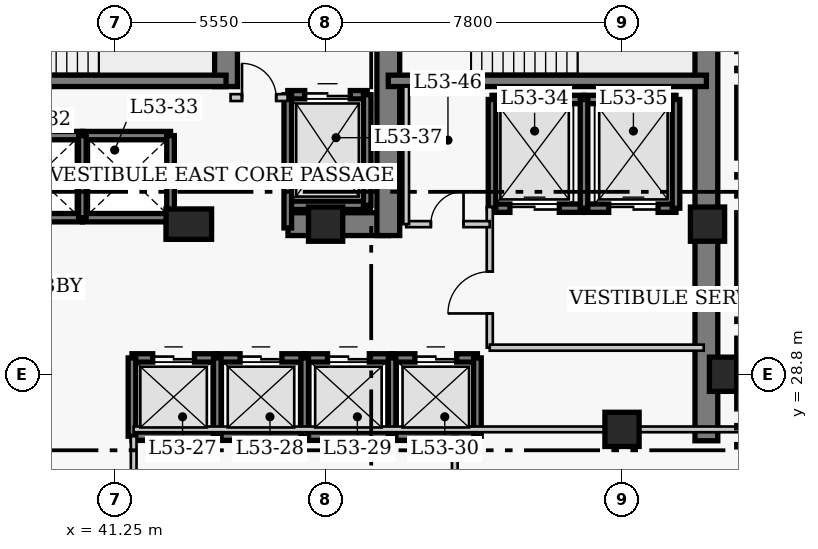
"""IFC4 building model, lengths in metres.
Left out: names, types, materials, properties, quantities, classifications, styles, units other than length and angle.
Written with IfcOpenShell. Run it as: python <this file> out.ifc"""

import sys

from ifc_helpers import new_model, si_unit, direction, frame, frame_2d, origin, origin_2d, place, context, subcontext, project, spatial, rectangle, extrude, element, fill, save


model = new_model("IFC4")
c1 = context("Model", 3, precision=1e-05, world=origin(), true_north=direction((0.0, 1.0)))
c2 = subcontext(c1, "Body", "Model", "MODEL_VIEW")
j1 = project(units=[si_unit("LENGTHUNIT", "METRE"), si_unit("PLANEANGLEUNIT", "RADIAN")], contexts=[c1])
p1 = place(None, origin())
s1 = spatial("IfcSite", under=j1, at=p1, CompositionType="ELEMENT")
p2 = place(p1, origin())
s2 = spatial("IfcBuilding", under=s1, at=p2, CompositionType="ELEMENT")
p3 = place(p2, frame((0.0, 0.0, 212.4)))
s3 = spatial("IfcBuildingStorey", under=s2, at=p3, CompositionType="ELEMENT", Elevation=212.4)
p4 = place(p3, frame((56.82, 27.05, 0.0), z_axis=(0.0, 0.0, 1.0), x_axis=(0.0, 1.0, 0.0)))
e1 = element("IfcWall", 1, at=p4, inside=s3, PredefinedType="SHEAR", context=c2, shape_type="SweptSolid", body=[
    extrude(rectangle(XDim=13.57, YDim=0.6, at=frame_2d((6.785, 0.0))), origin(), (0.0, 0.0, 1.0), 3.9),
])
p5 = place(p3, frame((45.81, 32.75, 0.0), z_axis=(0.0, 0.0, 1.0), x_axis=(1.0, 0.0, 0.0)))
e2 = element("IfcWall", 2, at=p5, inside=s3, PredefinedType="SHEAR", context=c2, shape_type="SweptSolid", body=[
    extrude(rectangle(XDim=2.64, YDim=0.6, at=frame_2d((1.32, 0.0))), origin(), (0.0, 0.0, 1.0), 3.9),
])
p6 = place(p3, frame((44.18, 36.37, 0.0), z_axis=(0.0, 0.0, 1.0), x_axis=(0.0, 1.0, 0.0)))
e3 = element("IfcWall", 3, at=p6, inside=s3, PredefinedType="SHEAR", context=c2, shape_type="SweptSolid", body=[
    extrude(rectangle(XDim=3.95, YDim=0.6, at=frame_2d((1.975, 0.0))), origin(), (0.0, 0.0, 1.0), 3.9),
])
p7 = place(p3, frame((48.45, 32.45, 0.0), z_axis=(0.0, 0.0, 1.0), x_axis=(0.0, 1.0, 0.0)))
e4 = element("IfcWall", 4, at=p7, inside=s3, PredefinedType="SHEAR", context=c2, shape_type="SweptSolid", body=[
    extrude(rectangle(XDim=7.87, YDim=0.6, at=frame_2d((3.935, 0.0))), origin(), (0.0, 0.0, 1.0), 3.9),
])
p8 = place(p7, frame((5.75, 0.0, 0.0)))
e5 = element("IfcOpeningElement", 5, at=p8, cuts=e4, PredefinedType="OPENING", context=c2, shape_type="SweptSolid", body=[
    extrude(rectangle(XDim=1.1, YDim=2.15, at=frame_2d((0.55, 1.075))), frame((0.0, 0.31, 0.0), z_axis=(0.0, -1.0, 0.0), x_axis=(1.0, 0.0, 0.0)), (0.0, 0.0, 1.0), 0.62),
])
p9 = place(p3, frame((35.85, 36.52, 0.0), z_axis=(0.0, 0.0, 1.0), x_axis=(1.0, 0.0, 0.0)))
e6 = element("IfcWall", 6, at=p9, inside=s3, PredefinedType="SHEAR", context=c2, shape_type="SweptSolid", body=[
    extrude(rectangle(XDim=8.33, YDim=0.3, at=frame_2d((4.165, 0.0))), origin(), (0.0, 0.0, 1.0), 3.9),
])
p10 = place(p3, frame((48.45, 36.52, 0.0), z_axis=(0.0, 0.0, 1.0), x_axis=(1.0, 0.0, 0.0)))
e7 = element("IfcWall", 7, at=p10, inside=s3, PredefinedType="SHEAR", context=c2, shape_type="SweptSolid", body=[
    extrude(rectangle(XDim=8.37, YDim=0.3, at=frame_2d((4.185, 0.0))), origin(), (0.0, 0.0, 1.0), 3.9),
])
p11 = place(p3, frame((57.35, 28.8, 0.0), z_axis=(0.0, 0.0, 1.0), x_axis=(1.0, 0.0, 0.0)))
e8 = element("IfcColumn", 8, at=p11, inside=s3, PredefinedType="COLUMN", context=c2, shape_type="SweptSolid", body=[
    extrude(rectangle(XDim=0.9, YDim=0.9, at=origin_2d()), origin(), (0.0, 0.0, 1.0), 3.9),
])
p12 = place(p3, frame((43.2, 32.75, 0.0), z_axis=(0.0, 0.0, 1.0), x_axis=(1.0, 0.0, 0.0)))
e9 = element("IfcColumn", 9, at=p12, inside=s3, PredefinedType="COLUMN", context=c2, shape_type="SweptSolid", body=[
    extrude(rectangle(XDim=1.2, YDim=0.8, at=origin_2d()), origin(), (0.0, 0.0, 1.0), 3.9),
])
for number, where, z_axis, x_axis in (
    (10, (46.8, 32.75, 0.0), (0.0, 0.0, 1.0), (1.0, 0.0, 0.0)),
    (11, (54.6, 27.35, 0.0), (0.0, 0.0, 1.0), (1.0, 0.0, 0.0)),
    (12, (56.85, 32.75, 0.0), (0.0, 0.0, 1.0), (1.0, 0.0, 0.0)),
):
    element("IfcColumn", number, at=place(p3, frame(where, z_axis=z_axis, x_axis=x_axis)), inside=s3, PredefinedType="COLUMN", context=c2, shape_type="SweptSolid", body=[
        extrude(rectangle(XDim=0.9, YDim=0.9, at=origin_2d()), origin(), (0.0, 0.0, 1.0), 3.9),
    ])
p13 = place(p3, frame((41.705, 29.23, 0.0), z_axis=(0.0, 0.0, 1.0), x_axis=(1.0, 0.0, 0.0)))
e13 = element("IfcWall", 13, at=p13, inside=s3, PredefinedType="SHEAR", context=c2, shape_type="SweptSolid", body=[
    extrude(rectangle(XDim=2.245, YDim=0.22, at=frame_2d((1.123, 0.0))), origin(), (0.0, 0.0, 1.0), 3.9),
])
p14 = place(p13, frame((0.545, 0.0, 0.0)))
e14 = element("IfcOpeningElement", 14, at=p14, cuts=e13, PredefinedType="OPENING", context=c2, shape_type="SweptSolid", body=[
    extrude(rectangle(XDim=1.1, YDim=2.15, at=frame_2d((0.55, 1.075))), frame((0.0, 0.12, 0.0), z_axis=(0.0, -1.0, 0.0), x_axis=(1.0, 0.0, 0.0)), (0.0, 0.0, 1.0), 0.24),
])
p15 = place(p3, frame((41.705, 27.17, 0.0), z_axis=(0.0, 0.0, 1.0), x_axis=(1.0, 0.0, 0.0)))
e15 = element("IfcWall", 15, at=p15, inside=s3, PredefinedType="SHEAR", context=c2, shape_type="SweptSolid", body=[
    extrude(rectangle(XDim=2.245, YDim=0.22, at=frame_2d((1.123, 0.0))), origin(), (0.0, 0.0, 1.0), 3.9),
])
p16 = place(p3, frame((41.705, 27.17, 0.0), z_axis=(0.0, 0.0, 1.0), x_axis=(0.0, 1.0, 0.0)))
e16 = element("IfcWall", 16, at=p16, inside=s3, PredefinedType="SHEAR", context=c2, shape_type="SweptSolid", body=[
    extrude(rectangle(XDim=2.06, YDim=0.2, at=frame_2d((1.03, 0.0))), origin(), (0.0, 0.0, 1.0), 3.9),
])
p17 = place(p3, frame((43.95, 29.23, 0.0), z_axis=(0.0, 0.0, 1.0), x_axis=(1.0, 0.0, 0.0)))
e17 = element("IfcWall", 17, at=p17, inside=s3, PredefinedType="SHEAR", context=c2, shape_type="SweptSolid", body=[
    extrude(rectangle(XDim=2.3, YDim=0.22, at=frame_2d((1.15, 0.0))), origin(), (0.0, 0.0, 1.0), 3.9),
])
p18 = place(p17, frame((0.6, 0.0, 0.0)))
e18 = element("IfcOpeningElement", 18, at=p18, cuts=e17, PredefinedType="OPENING", context=c2, shape_type="SweptSolid", body=[
    extrude(rectangle(XDim=1.1, YDim=2.15, at=frame_2d((0.55, 1.075))), frame((0.0, 0.12, 0.0), z_axis=(0.0, -1.0, 0.0), x_axis=(1.0, 0.0, 0.0)), (0.0, 0.0, 1.0), 0.24),
])
p19 = place(p3, frame((43.95, 27.17, 0.0), z_axis=(0.0, 0.0, 1.0), x_axis=(1.0, 0.0, 0.0)))
e19 = element("IfcWall", 19, at=p19, inside=s3, PredefinedType="SHEAR", context=c2, shape_type="SweptSolid", body=[
    extrude(rectangle(XDim=2.3, YDim=0.22, at=frame_2d((1.15, 0.0))), origin(), (0.0, 0.0, 1.0), 3.9),
])
p20 = place(p3, frame((43.95, 27.17, 0.0), z_axis=(0.0, 0.0, 1.0), x_axis=(0.0, 1.0, 0.0)))
e20 = element("IfcWall", 20, at=p20, inside=s3, PredefinedType="SHEAR", context=c2, shape_type="SweptSolid", body=[
    extrude(rectangle(XDim=2.06, YDim=0.2, at=frame_2d((1.03, 0.0))), origin(), (0.0, 0.0, 1.0), 3.9),
])
p21 = place(p3, frame((46.25, 29.23, 0.0), z_axis=(0.0, 0.0, 1.0), x_axis=(1.0, 0.0, 0.0)))
e21 = element("IfcWall", 21, at=p21, inside=s3, PredefinedType="SHEAR", context=c2, shape_type="SweptSolid", body=[
    extrude(rectangle(XDim=2.3, YDim=0.22, at=frame_2d((1.15, 0.0))), origin(), (0.0, 0.0, 1.0), 3.9),
])
p22 = place(p21, frame((0.6, 0.0, 0.0)))
e22 = element("IfcOpeningElement", 22, at=p22, cuts=e21, PredefinedType="OPENING", context=c2, shape_type="SweptSolid", body=[
    extrude(rectangle(XDim=1.1, YDim=2.15, at=frame_2d((0.55, 1.075))), frame((0.0, 0.12, 0.0), z_axis=(0.0, -1.0, 0.0), x_axis=(1.0, 0.0, 0.0)), (0.0, 0.0, 1.0), 0.24),
])
p23 = place(p3, frame((46.25, 27.17, 0.0), z_axis=(0.0, 0.0, 1.0), x_axis=(1.0, 0.0, 0.0)))
e23 = element("IfcWall", 23, at=p23, inside=s3, PredefinedType="SHEAR", context=c2, shape_type="SweptSolid", body=[
    extrude(rectangle(XDim=2.3, YDim=0.22, at=frame_2d((1.15, 0.0))), origin(), (0.0, 0.0, 1.0), 3.9),
])
p24 = place(p3, frame((46.25, 27.17, 0.0), z_axis=(0.0, 0.0, 1.0), x_axis=(0.0, 1.0, 0.0)))
e24 = element("IfcWall", 24, at=p24, inside=s3, PredefinedType="SHEAR", context=c2, shape_type="SweptSolid", body=[
    extrude(rectangle(XDim=2.06, YDim=0.2, at=frame_2d((1.03, 0.0))), origin(), (0.0, 0.0, 1.0), 3.9),
])
p25 = place(p3, frame((48.55, 29.23, 0.0), z_axis=(0.0, 0.0, 1.0), x_axis=(1.0, 0.0, 0.0)))
e25 = element("IfcWall", 25, at=p25, inside=s3, PredefinedType="SHEAR", context=c2, shape_type="SweptSolid", body=[
    extrude(rectangle(XDim=2.245, YDim=0.22, at=frame_2d((1.123, 0.0))), origin(), (0.0, 0.0, 1.0), 3.9),
])
p26 = place(p25, frame((0.6, 0.0, 0.0)))
e26 = element("IfcOpeningElement", 26, at=p26, cuts=e25, PredefinedType="OPENING", context=c2, shape_type="SweptSolid", body=[
    extrude(rectangle(XDim=1.1, YDim=2.15, at=frame_2d((0.55, 1.075))), frame((0.0, 0.12, 0.0), z_axis=(0.0, -1.0, 0.0), x_axis=(1.0, 0.0, 0.0)), (0.0, 0.0, 1.0), 0.24),
])
p27 = place(p3, frame((48.55, 27.17, 0.0), z_axis=(0.0, 0.0, 1.0), x_axis=(1.0, 0.0, 0.0)))
e27 = element("IfcWall", 27, at=p27, inside=s3, PredefinedType="SHEAR", context=c2, shape_type="SweptSolid", body=[
    extrude(rectangle(XDim=2.245, YDim=0.22, at=frame_2d((1.123, 0.0))), origin(), (0.0, 0.0, 1.0), 3.9),
])
for number, where, z_axis, x_axis in (
    (28, (48.55, 27.17, 0.0), (0.0, 0.0, 1.0), (0.0, 1.0, 0.0)),
    (29, (50.795, 27.17, 0.0), (0.0, 0.0, 1.0), (0.0, 1.0, 0.0)),
):
    element("IfcWall", number, at=place(p3, frame(where, z_axis=z_axis, x_axis=x_axis)), inside=s3, PredefinedType="SHEAR", context=c2, shape_type="SweptSolid", body=[
        extrude(rectangle(XDim=2.06, YDim=0.2, at=frame_2d((1.03, 0.0))), origin(), (0.0, 0.0, 1.0), 3.9),
    ])
for number, where, z_axis, x_axis in (
    (30, (38.0, 35.08, 0.0), (0.0, 0.0, 1.0), (1.0, 0.0, 0.0)),
    (31, (38.0, 32.92, 0.0), (0.0, 0.0, 1.0), (1.0, 0.0, 0.0)),
):
    element("IfcWall", number, at=place(p3, frame(where, z_axis=z_axis, x_axis=x_axis)), inside=s3, PredefinedType="SHEAR", context=c2, shape_type="SweptSolid", body=[
        extrude(rectangle(XDim=2.4, YDim=0.22, at=frame_2d((1.2, 0.0))), origin(), (0.0, 0.0, 1.0), 3.9),
    ])
for number, where, z_axis, x_axis in (
    (32, (40.4, 35.08, 0.0), (0.0, 0.0, 1.0), (1.0, 0.0, 0.0)),
    (33, (40.4, 32.92, 0.0), (0.0, 0.0, 1.0), (1.0, 0.0, 0.0)),
):
    element("IfcWall", number, at=place(p3, frame(where, z_axis=z_axis, x_axis=x_axis)), inside=s3, PredefinedType="SHEAR", context=c2, shape_type="SweptSolid", body=[
        extrude(rectangle(XDim=2.32, YDim=0.22, at=frame_2d((1.16, 0.0))), origin(), (0.0, 0.0, 1.0), 3.9),
    ])
for number, where, z_axis, x_axis in (
    (34, (40.4, 32.92, 0.0), (0.0, 0.0, 1.0), (0.0, 1.0, 0.0)),
    (35, (42.72, 32.92, 0.0), (0.0, 0.0, 1.0), (0.0, 1.0, 0.0)),
):
    element("IfcWall", number, at=place(p3, frame(where, z_axis=z_axis, x_axis=x_axis)), inside=s3, PredefinedType="SHEAR", context=c2, shape_type="SweptSolid", body=[
        extrude(rectangle(XDim=2.16, YDim=0.2, at=frame_2d((1.08, 0.0))), origin(), (0.0, 0.0, 1.0), 3.9),
    ])
p28 = place(p3, frame((51.18, 36.03, 0.0), z_axis=(0.0, 0.0, 1.0), x_axis=(1.0, 0.0, 0.0)))
e36 = element("IfcWall", 36, at=p28, inside=s3, PredefinedType="SHEAR", context=c2, shape_type="SweptSolid", body=[
    extrude(rectangle(XDim=2.42, YDim=0.22, at=frame_2d((1.21, 0.0))), origin(), (0.0, 0.0, 1.0), 3.9),
])
p29 = place(p3, frame((51.18, 33.17, 0.0), z_axis=(0.0, 0.0, 1.0), x_axis=(1.0, 0.0, 0.0)))
e37 = element("IfcWall", 37, at=p29, inside=s3, PredefinedType="SHEAR", context=c2, shape_type="SweptSolid", body=[
    extrude(rectangle(XDim=2.42, YDim=0.22, at=frame_2d((1.21, 0.0))), origin(), (0.0, 0.0, 1.0), 3.9),
])
p30 = place(p29, frame((0.47, 0.0, 0.0)))
e38 = element("IfcOpeningElement", 38, at=p30, cuts=e37, PredefinedType="OPENING", context=c2, shape_type="SweptSolid", body=[
    extrude(rectangle(XDim=1.3, YDim=2.15, at=frame_2d((0.65, 1.075))), frame((0.0, 0.12, 0.0), z_axis=(0.0, -1.0, 0.0), x_axis=(1.0, 0.0, 0.0)), (0.0, 0.0, 1.0), 0.24),
])
p31 = place(p3, frame((51.18, 33.17, 0.0), z_axis=(0.0, 0.0, 1.0), x_axis=(0.0, 1.0, 0.0)))
e39 = element("IfcWall", 39, at=p31, inside=s3, PredefinedType="SHEAR", context=c2, shape_type="SweptSolid", body=[
    extrude(rectangle(XDim=2.86, YDim=0.2, at=frame_2d((1.43, 0.0))), origin(), (0.0, 0.0, 1.0), 3.9),
])
p32 = place(p3, frame((53.6, 36.03, 0.0), z_axis=(0.0, 0.0, 1.0), x_axis=(1.0, 0.0, 0.0)))
e40 = element("IfcWall", 40, at=p32, inside=s3, PredefinedType="SHEAR", context=c2, shape_type="SweptSolid", body=[
    extrude(rectangle(XDim=2.42, YDim=0.22, at=frame_2d((1.21, 0.0))), origin(), (0.0, 0.0, 1.0), 3.9),
])
p33 = place(p3, frame((53.6, 33.17, 0.0), z_axis=(0.0, 0.0, 1.0), x_axis=(1.0, 0.0, 0.0)))
e41 = element("IfcWall", 41, at=p33, inside=s3, PredefinedType="SHEAR", context=c2, shape_type="SweptSolid", body=[
    extrude(rectangle(XDim=2.42, YDim=0.22, at=frame_2d((1.21, 0.0))), origin(), (0.0, 0.0, 1.0), 3.9),
])
p34 = place(p33, frame((0.65, 0.0, 0.0)))
e42 = element("IfcOpeningElement", 42, at=p34, cuts=e41, PredefinedType="OPENING", context=c2, shape_type="SweptSolid", body=[
    extrude(rectangle(XDim=1.3, YDim=2.15, at=frame_2d((0.65, 1.075))), frame((0.0, 0.12, 0.0), z_axis=(0.0, -1.0, 0.0), x_axis=(1.0, 0.0, 0.0)), (0.0, 0.0, 1.0), 0.24),
])
for number, where, z_axis, x_axis in (
    (43, (53.6, 33.17, 0.0), (0.0, 0.0, 1.0), (0.0, 1.0, 0.0)),
    (44, (56.02, 33.17, 0.0), (0.0, 0.0, 1.0), (0.0, 1.0, 0.0)),
):
    element("IfcWall", number, at=place(p3, frame(where, z_axis=z_axis, x_axis=x_axis)), inside=s3, PredefinedType="SHEAR", context=c2, shape_type="SweptSolid", body=[
        extrude(rectangle(XDim=2.86, YDim=0.2, at=frame_2d((1.43, 0.0))), origin(), (0.0, 0.0, 1.0), 3.9),
    ])
p35 = place(p3, frame((45.805, 36.155, 0.0), z_axis=(0.0, 0.0, 1.0), x_axis=(1.0, 0.0, 0.0)))
e45 = element("IfcWall", 45, at=p35, inside=s3, PredefinedType="SHEAR", context=c2, shape_type="SweptSolid", body=[
    extrude(rectangle(XDim=2.09, YDim=0.22, at=frame_2d((1.045, 0.0))), origin(), (0.0, 0.0, 1.0), 3.9),
])
p36 = place(p35, frame((0.445, 0.0, 0.0)))
e46 = element("IfcOpeningElement", 46, at=p36, cuts=e45, PredefinedType="OPENING", context=c2, shape_type="SweptSolid", body=[
    extrude(rectangle(XDim=1.2, YDim=2.15, at=frame_2d((0.6, 1.075))), frame((0.0, 0.12, 0.0), z_axis=(0.0, -1.0, 0.0), x_axis=(1.0, 0.0, 0.0)), (0.0, 0.0, 1.0), 0.24),
])
p37 = place(p3, frame((45.805, 33.245, 0.0), z_axis=(0.0, 0.0, 1.0), x_axis=(1.0, 0.0, 0.0)))
e47 = element("IfcWall", 47, at=p37, inside=s3, PredefinedType="SHEAR", context=c2, shape_type="SweptSolid", body=[
    extrude(rectangle(XDim=2.09, YDim=0.22, at=frame_2d((1.045, 0.0))), origin(), (0.0, 0.0, 1.0), 3.9),
])
p38 = place(p3, frame((45.805, 32.65, 0.0), z_axis=(0.0, 0.0, 1.0), x_axis=(0.0, 1.0, 0.0)))
e48 = element("IfcWall", 48, at=p38, inside=s3, PredefinedType="SHEAR", context=c2, shape_type="SweptSolid", body=[
    extrude(rectangle(XDim=3.505, YDim=0.2, at=frame_2d((1.752, 0.0))), origin(), (0.0, 0.0, 1.0), 3.9),
])
p39 = place(p3, frame((47.895, 33.245, 0.0), z_axis=(0.0, 0.0, 1.0), x_axis=(0.0, 1.0, 0.0)))
e49 = element("IfcWall", 49, at=p39, inside=s3, PredefinedType="SHEAR", context=c2, shape_type="SweptSolid", body=[
    extrude(rectangle(XDim=2.91, YDim=0.2, at=frame_2d((1.455, 0.0))), origin(), (0.0, 0.0, 1.0), 3.9),
])
p40 = place(p3, frame((44.3, 36.08, 0.0), z_axis=(0.0, 0.0, 1.0), x_axis=(1.0, 0.0, 0.0)))
e50 = element("IfcWall", 50, at=p40, inside=s3, PredefinedType="PARTITIONING", context=c2, shape_type="SweptSolid", body=[
    extrude(rectangle(XDim=1.5, YDim=0.18, at=frame_2d((0.75, 0.0))), origin(), (0.0, 0.0, 1.0), 3.65),
])
p41 = place(p40, frame((0.3, 0.0, 0.0)))
e51 = element("IfcOpeningElement", 51, at=p41, cuts=e50, PredefinedType="OPENING", context=c2, shape_type="SweptSolid", body=[
    extrude(rectangle(XDim=0.9, YDim=2.15, at=frame_2d((0.45, 1.075))), frame((0.0, 0.1, 0.0), z_axis=(0.0, -1.0, 0.0), x_axis=(1.0, 0.0, 0.0)), (0.0, 0.0, 1.0), 0.2),
])
p42 = place(p3, frame((51.12, 29.5, 0.0), z_axis=(0.0, 0.0, 1.0), x_axis=(0.0, 1.0, 0.0)))
e52 = element("IfcWall", 52, at=p42, inside=s3, PredefinedType="PARTITIONING", context=c2, shape_type="SweptSolid", body=[
    extrude(rectangle(XDim=3.7, YDim=0.16, at=frame_2d((1.85, 0.0))), origin(), (0.0, 0.0, 1.0), 3.65),
])
p43 = place(p42, frame((0.9, 0.0, 0.0)))
e53 = element("IfcOpeningElement", 53, at=p43, cuts=e52, PredefinedType="OPENING", context=c2, shape_type="SweptSolid", body=[
    extrude(rectangle(XDim=1.1, YDim=2.15, at=frame_2d((0.55, 1.075))), frame((0.0, 0.09, 0.0), z_axis=(0.0, -1.0, 0.0), x_axis=(1.0, 0.0, 0.0)), (0.0, 0.0, 1.0), 0.18),
])
p44 = place(p3, frame((51.12, 29.5, 0.0), z_axis=(0.0, 0.0, 1.0), x_axis=(1.0, 0.0, 0.0)))
e54 = element("IfcWall", 54, at=p44, inside=s3, PredefinedType="PARTITIONING", context=c2, shape_type="SweptSolid", body=[
    extrude(rectangle(XDim=5.63, YDim=0.16, at=frame_2d((2.815, 0.0))), origin(), (0.0, 0.0, 1.0), 3.65),
])
p45 = place(p3, frame((48.92, 32.75, 0.0), z_axis=(0.0, 0.0, 1.0), x_axis=(1.0, 0.0, 0.0)))
e55 = element("IfcWall", 55, at=p45, inside=s3, PredefinedType="PARTITIONING", context=c2, shape_type="SweptSolid", body=[
    extrude(rectangle(XDim=2.2, YDim=0.16, at=frame_2d((1.1, 0.0))), origin(), (0.0, 0.0, 1.0), 3.65),
])
p46 = place(p45, frame((0.65, 0.0, 0.0)))
e56 = element("IfcOpeningElement", 56, at=p46, cuts=e55, PredefinedType="OPENING", context=c2, shape_type="SweptSolid", body=[
    extrude(rectangle(XDim=0.86, YDim=2.05, at=frame_2d((0.43, 1.025))), frame((0.0, 0.09, 0.0), z_axis=(0.0, -1.0, 0.0), x_axis=(1.0, 0.0, 0.0)), (0.0, 0.0, 1.0), 0.18),
])
p47 = place(p3, frame((48.92, 32.75, 0.0), z_axis=(0.0, 0.0, 1.0), x_axis=(0.0, 1.0, 0.0)))
e57 = element("IfcWall", 57, at=p47, inside=s3, PredefinedType="PARTITIONING", context=c2, shape_type="SweptSolid", body=[
    extrude(rectangle(XDim=3.62, YDim=0.15, at=frame_2d((1.81, 0.0))), origin(), (0.0, 0.0, 1.0), 3.65),
])
p48 = place(p3, frame((41.75, 16.86, 0.0), z_axis=(0.0, 0.0, 1.0), x_axis=(0.0, 1.0, 0.0)))
e58 = element("IfcWall", 58, at=p48, inside=s3, PredefinedType="PARTITIONING", context=c2, shape_type="SweptSolid", body=[
    extrude(rectangle(XDim=10.31, YDim=0.15, at=frame_2d((5.155, 0.0))), origin(), (0.0, 0.0, 1.0), 3.65),
])
p49 = place(p3, frame((50.2, 16.86, 0.0), z_axis=(0.0, 0.0, 1.0), x_axis=(0.0, 1.0, 0.0)))
e59 = element("IfcWall", 59, at=p49, inside=s3, PredefinedType="PARTITIONING", context=c2, shape_type="SweptSolid", body=[
    extrude(rectangle(XDim=10.29, YDim=0.15, at=frame_2d((5.145, 0.0))), origin(), (0.0, 0.0, 1.0), 3.65),
])
p50 = place(p3, frame((41.75, 27.35, 0.0), z_axis=(0.0, 0.0, 1.0), x_axis=(1.0, 0.0, 0.0)))
e60 = element("IfcWall", 60, at=p50, inside=s3, PredefinedType="PARTITIONING", context=c2, shape_type="SweptSolid", body=[
    extrude(rectangle(XDim=16.84, YDim=0.15, at=frame_2d((8.42, 0.0))), origin(), (0.0, 0.0, 1.0), 3.65),
])
p51 = place(p14, origin())
e61 = element("IfcDoor", 61, at=p51, inside=s3, OperationType="DOUBLE_DOOR_SLIDING", PredefinedType="DOOR", context=c2, shape_type="SweptSolid", body=[
    extrude(rectangle(XDim=1.1, YDim=2.15, at=frame_2d((0.55, 1.075))), frame((0.0, 0.025, 0.0), z_axis=(0.0, -1.0, 0.0), x_axis=(1.0, 0.0, 0.0)), (0.0, 0.0, 1.0), 0.05),
])
fill(e14, e61)
p52 = place(p18, origin())
e62 = element("IfcDoor", 62, at=p52, inside=s3, OperationType="DOUBLE_DOOR_SLIDING", PredefinedType="DOOR", context=c2, shape_type="SweptSolid", body=[
    extrude(rectangle(XDim=1.1, YDim=2.15, at=frame_2d((0.55, 1.075))), frame((0.0, 0.025, 0.0), z_axis=(0.0, -1.0, 0.0), x_axis=(1.0, 0.0, 0.0)), (0.0, 0.0, 1.0), 0.05),
])
fill(e18, e62)
p53 = place(p22, origin())
e63 = element("IfcDoor", 63, at=p53, inside=s3, OperationType="DOUBLE_DOOR_SLIDING", PredefinedType="DOOR", context=c2, shape_type="SweptSolid", body=[
    extrude(rectangle(XDim=1.1, YDim=2.15, at=frame_2d((0.55, 1.075))), frame((0.0, 0.025, 0.0), z_axis=(0.0, -1.0, 0.0), x_axis=(1.0, 0.0, 0.0)), (0.0, 0.0, 1.0), 0.05),
])
fill(e22, e63)
p54 = place(p26, origin())
e64 = element("IfcDoor", 64, at=p54, inside=s3, OperationType="DOUBLE_DOOR_SLIDING", PredefinedType="DOOR", context=c2, shape_type="SweptSolid", body=[
    extrude(rectangle(XDim=1.1, YDim=2.15, at=frame_2d((0.55, 1.075))), frame((0.0, 0.025, 0.0), z_axis=(0.0, -1.0, 0.0), x_axis=(1.0, 0.0, 0.0)), (0.0, 0.0, 1.0), 0.05),
])
fill(e26, e64)
p55 = place(p30, origin())
e65 = element("IfcDoor", 65, at=p55, inside=s3, OperationType="DOUBLE_DOOR_SLIDING", PredefinedType="DOOR", context=c2, shape_type="SweptSolid", body=[
    extrude(rectangle(XDim=1.3, YDim=2.15, at=frame_2d((0.65, 1.075))), frame((0.0, 0.025, 0.0), z_axis=(0.0, -1.0, 0.0), x_axis=(1.0, 0.0, 0.0)), (0.0, 0.0, 1.0), 0.05),
])
fill(e38, e65)
p56 = place(p34, origin())
e66 = element("IfcDoor", 66, at=p56, inside=s3, OperationType="DOUBLE_DOOR_SLIDING", PredefinedType="DOOR", context=c2, shape_type="SweptSolid", body=[
    extrude(rectangle(XDim=1.3, YDim=2.15, at=frame_2d((0.65, 1.075))), frame((0.0, 0.025, 0.0), z_axis=(0.0, -1.0, 0.0), x_axis=(1.0, 0.0, 0.0)), (0.0, 0.0, 1.0), 0.05),
])
fill(e42, e66)
p57 = place(p36, origin())
e67 = element("IfcDoor", 67, at=p57, inside=s3, OperationType="DOUBLE_DOOR_SLIDING", PredefinedType="DOOR", context=c2, shape_type="SweptSolid", body=[
    extrude(rectangle(XDim=1.2, YDim=2.15, at=frame_2d((0.6, 1.075))), frame((0.0, 0.025, 0.0), z_axis=(0.0, -1.0, 0.0), x_axis=(1.0, 0.0, 0.0)), (0.0, 0.0, 1.0), 0.05),
])
fill(e46, e67)
p58 = place(p41, origin())
e68 = element("IfcDoor", 68, at=p58, inside=s3, OperationType="SINGLE_SWING_LEFT", PredefinedType="DOOR", context=c2, shape_type="SweptSolid", body=[
    extrude(rectangle(XDim=0.9, YDim=2.15, at=frame_2d((0.45, 1.075))), frame((0.0, 0.025, 0.0), z_axis=(0.0, -1.0, 0.0), x_axis=(1.0, 0.0, 0.0)), (0.0, 0.0, 1.0), 0.05),
])
fill(e51, e68)
p59 = place(p43, origin())
e69 = element("IfcDoor", 69, at=p59, inside=s3, OperationType="SINGLE_SWING_LEFT", PredefinedType="DOOR", context=c2, shape_type="SweptSolid", body=[
    extrude(rectangle(XDim=1.1, YDim=2.15, at=frame_2d((0.55, 1.075))), frame((0.0, 0.025, 0.0), z_axis=(0.0, -1.0, 0.0), x_axis=(1.0, 0.0, 0.0)), (0.0, 0.0, 1.0), 0.05),
])
fill(e53, e69)
p60 = place(p46, origin())
e70 = element("IfcDoor", 70, at=p60, inside=s3, OperationType="SINGLE_SWING_RIGHT", PredefinedType="DOOR", context=c2, shape_type="SweptSolid", body=[
    extrude(rectangle(XDim=0.86, YDim=2.05, at=frame_2d((0.43, 1.025))), frame((0.0, 0.025, 0.0), z_axis=(0.0, -1.0, 0.0), x_axis=(1.0, 0.0, 0.0)), (0.0, 0.0, 1.0), 0.05),
])
fill(e56, e70)
save(model, sys.argv[1])
